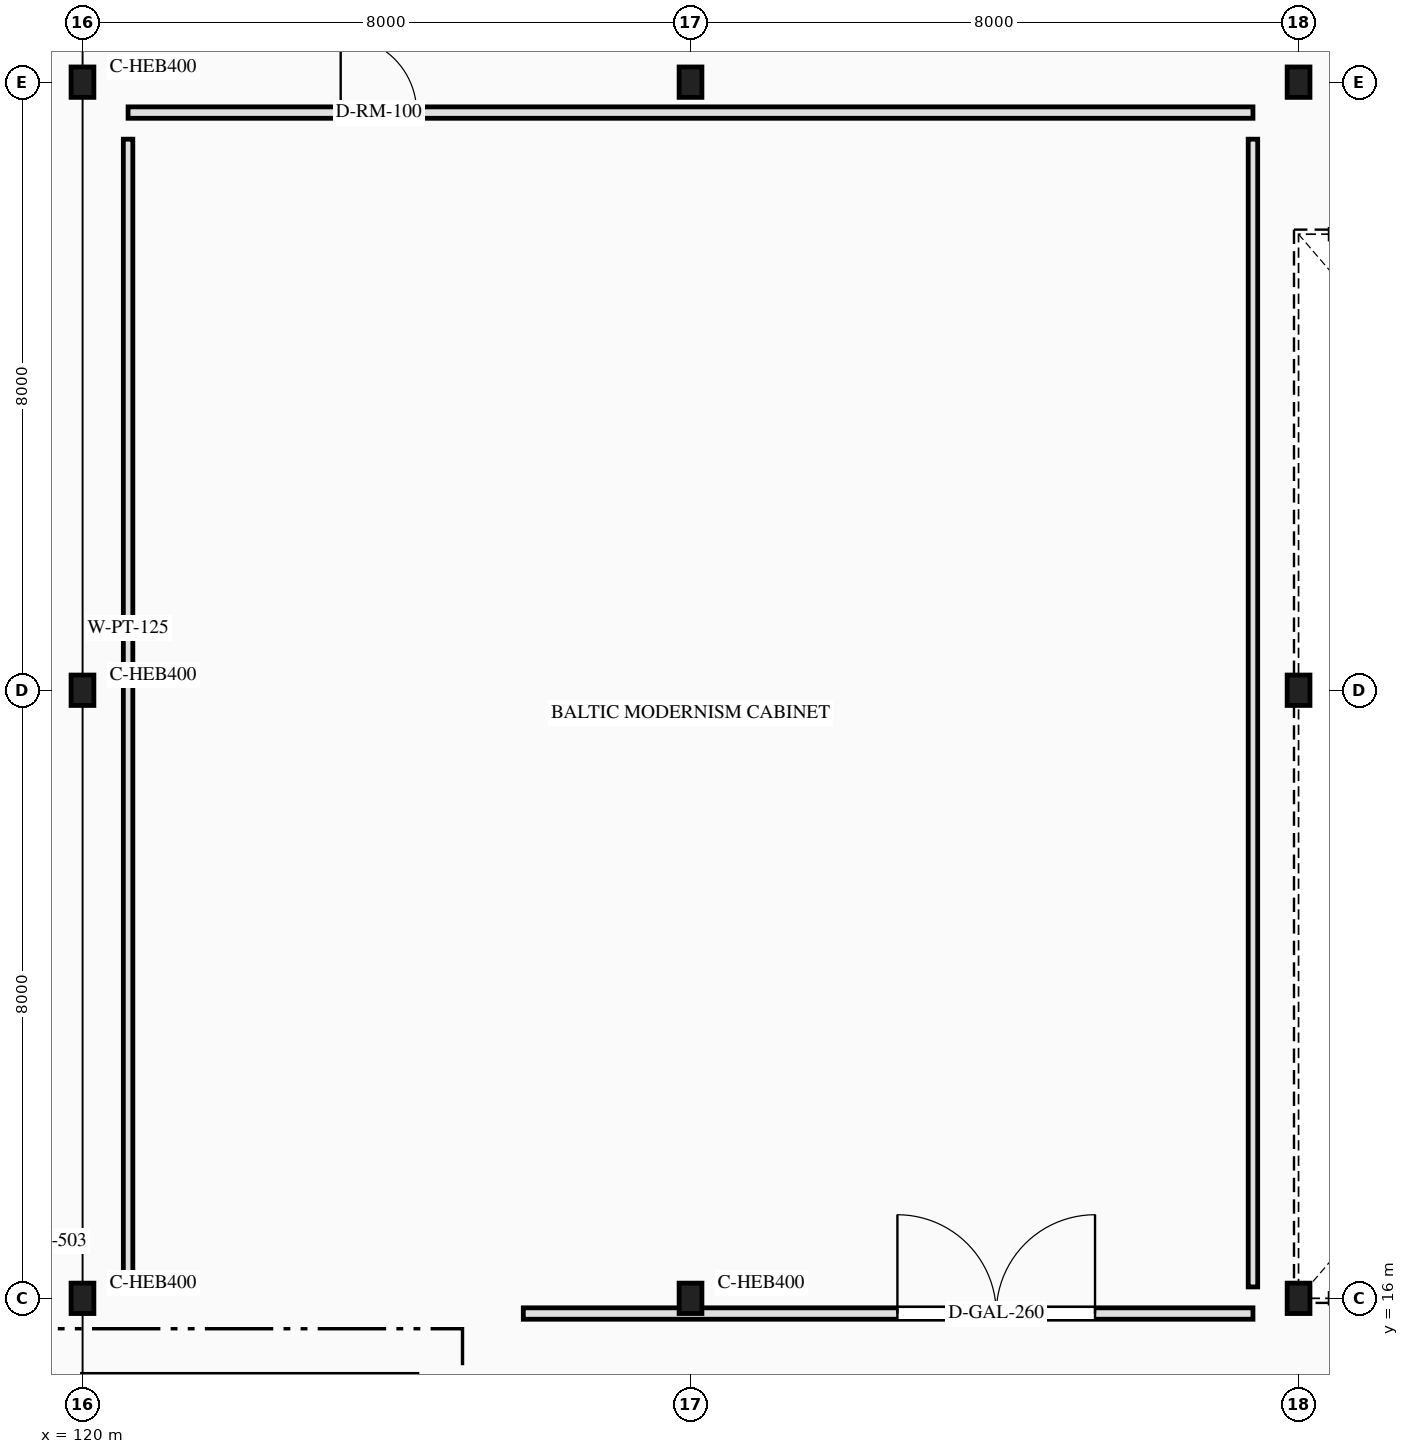
"""IFC4 building model, lengths in metres.
Left out: names, types, materials, properties, quantities, classifications, styles, units other than length and angle.
Written with IfcOpenShell. Run it as: python <this file> out.ifc"""

import sys

from ifc_helpers import new_model, si_unit, direction, frame, frame_2d, origin, origin_2d, place, context, subcontext, project, spatial, rectangle, i_section, extrude, element, fill, save


model = new_model("IFC4")
c1 = context("Model", 3, precision=1e-05, world=origin(), true_north=direction((0.0, 1.0)))
c2 = subcontext(c1, "Body", "Model", "MODEL_VIEW")
j1 = project(units=[si_unit("LENGTHUNIT", "METRE"), si_unit("PLANEANGLEUNIT", "RADIAN")], contexts=[c1])
p1 = place(None, origin())
s1 = spatial("IfcSite", under=j1, at=p1, CompositionType="ELEMENT")
p2 = place(p1, origin())
s2 = spatial("IfcBuilding", under=s1, at=p2, CompositionType="ELEMENT")
p3 = place(p2, frame((0.0, 0.0, 21.8)))
s3 = spatial("IfcBuildingStorey", under=s2, at=p3, CompositionType="ELEMENT", Elevation=21.8)
p4 = place(p3, frame((120.0, 14.85, 0.0), z_axis=(0.0, 0.0, 1.0), x_axis=(1.0, 0.0, 0.0)))
e1 = element("IfcWall", 1, at=p4, inside=s3, PredefinedType="SHEAR", context=c2, shape_type="SweptSolid", body=[
    extrude(rectangle(XDim=4.4, YDim=0.3, at=frame_2d((2.2, 0.0))), origin(), (0.0, 0.0, 1.0), 4.2),
])
for number, where, z_axis, x_axis in (
    (2, (120.0, 16.0, 0.0), (0.0, 0.0, 1.0), (1.0, 0.0, 0.0)),
    (3, (120.0, 24.0, 0.0), (0.0, 0.0, 1.0), (1.0, 0.0, 0.0)),
    (4, (120.0, 32.0, 0.0), (0.0, 0.0, 1.0), (1.0, 0.0, 0.0)),
    (5, (128.0, 16.0, 0.0), (0.0, 0.0, 1.0), (1.0, 0.0, 0.0)),
    (6, (128.0, 32.0, 0.0), (0.0, 0.0, 1.0), (1.0, 0.0, 0.0)),
    (7, (136.0, 16.0, 0.0), (0.0, 0.0, 1.0), (1.0, 0.0, 0.0)),
    (8, (136.0, 24.0, 0.0), (0.0, 0.0, 1.0), (1.0, 0.0, 0.0)),
    (9, (136.0, 32.0, 0.0), (0.0, 0.0, 1.0), (1.0, 0.0, 0.0)),
):
    element("IfcColumn", number, at=place(p3, frame(where, z_axis=z_axis, x_axis=x_axis)), inside=s3, PredefinedType="COLUMN", context=c2, shape_type="SweptSolid", body=[
        extrude(i_section(OverallWidth=0.3, OverallDepth=0.4, WebThickness=0.013, FlangeThickness=0.024, FilletRadius=0.027, at=origin_2d()), origin(), (0.0, 0.0, 1.0), 4.2),
    ])
p5 = place(p3, frame((120.6, 31.6, 0.0), z_axis=(0.0, 0.0, 1.0), x_axis=(1.0, 0.0, 0.0)))
e10 = element("IfcWall", 10, at=p5, inside=s3, PredefinedType="PARTITIONING", context=c2, shape_type="SweptSolid", body=[
    extrude(rectangle(XDim=14.8, YDim=0.15, at=frame_2d((7.4, 0.0))), origin(), (0.0, 0.0, 1.0), 3.92),
])
p6 = place(p5, frame((2.797, 0.0, 0.0)))
e11 = element("IfcOpeningElement", 11, at=p6, cuts=e10, PredefinedType="OPENING", context=c2, shape_type="SweptSolid", body=[
    extrude(rectangle(XDim=1.0, YDim=2.15, at=frame_2d((0.5, 1.075))), frame((0.0, 0.085, 0.0), z_axis=(0.0, -1.0, 0.0), x_axis=(1.0, 0.0, 0.0)), (0.0, 0.0, 1.0), 0.17),
])
p7 = place(p3, frame((125.8, 15.8, 0.0), z_axis=(0.0, 0.0, 1.0), x_axis=(1.0, 0.0, 0.0)))
e12 = element("IfcWall", 12, at=p7, inside=s3, PredefinedType="PARTITIONING", context=c2, shape_type="SweptSolid", body=[
    extrude(rectangle(XDim=9.6, YDim=0.15, at=frame_2d((4.8, 0.0))), origin(), (0.0, 0.0, 1.0), 3.48),
])
p8 = place(p7, frame((4.922, 0.0, 0.0)))
e13 = element("IfcOpeningElement", 13, at=p8, cuts=e12, PredefinedType="OPENING", context=c2, shape_type="SweptSolid", body=[
    extrude(rectangle(XDim=2.6, YDim=2.9, at=frame_2d((1.3, 1.45))), frame((0.0, 0.085, 0.0), z_axis=(0.0, -1.0, 0.0), x_axis=(1.0, 0.0, 0.0)), (0.0, 0.0, 1.0), 0.17),
])
for number, where, z_axis, x_axis in (
    (14, (120.6, 16.15, 0.0), (0.0, 0.0, 1.0), (0.0, 1.0, 0.0)),
    (15, (135.4, 16.15, 0.0), (0.0, 0.0, 1.0), (0.0, 1.0, 0.0)),
):
    element("IfcWall", number, at=place(p3, frame(where, z_axis=z_axis, x_axis=x_axis)), inside=s3, PredefinedType="PARTITIONING", context=c2, shape_type="SweptSolid", body=[
        extrude(rectangle(XDim=15.1, YDim=0.125, at=frame_2d((7.55, 0.0))), origin(), (0.0, 0.0, 1.0), 3.92),
    ])
p9 = place(p6, origin())
e16 = element("IfcDoor", 16, at=p9, inside=s3, OperationType="SINGLE_SWING_LEFT", PredefinedType="DOOR", context=c2, shape_type="SweptSolid", body=[
    extrude(rectangle(XDim=1.0, YDim=2.15, at=frame_2d((0.5, 1.075))), frame((0.0, 0.025, 0.0), z_axis=(0.0, -1.0, 0.0), x_axis=(1.0, 0.0, 0.0)), (0.0, 0.0, 1.0), 0.05),
])
fill(e11, e16)
p10 = place(p8, origin())
e17 = element("IfcDoor", 17, at=p10, inside=s3, OperationType="DOUBLE_DOOR_DOUBLE_SWING", PredefinedType="DOOR", context=c2, shape_type="SweptSolid", body=[
    extrude(rectangle(XDim=2.6, YDim=2.9, at=frame_2d((1.3, 1.45))), frame((0.0, 0.025, 0.0), z_axis=(0.0, -1.0, 0.0), x_axis=(1.0, 0.0, 0.0)), (0.0, 0.0, 1.0), 0.05),
])
fill(e13, e17)
save(model, sys.argv[1])
